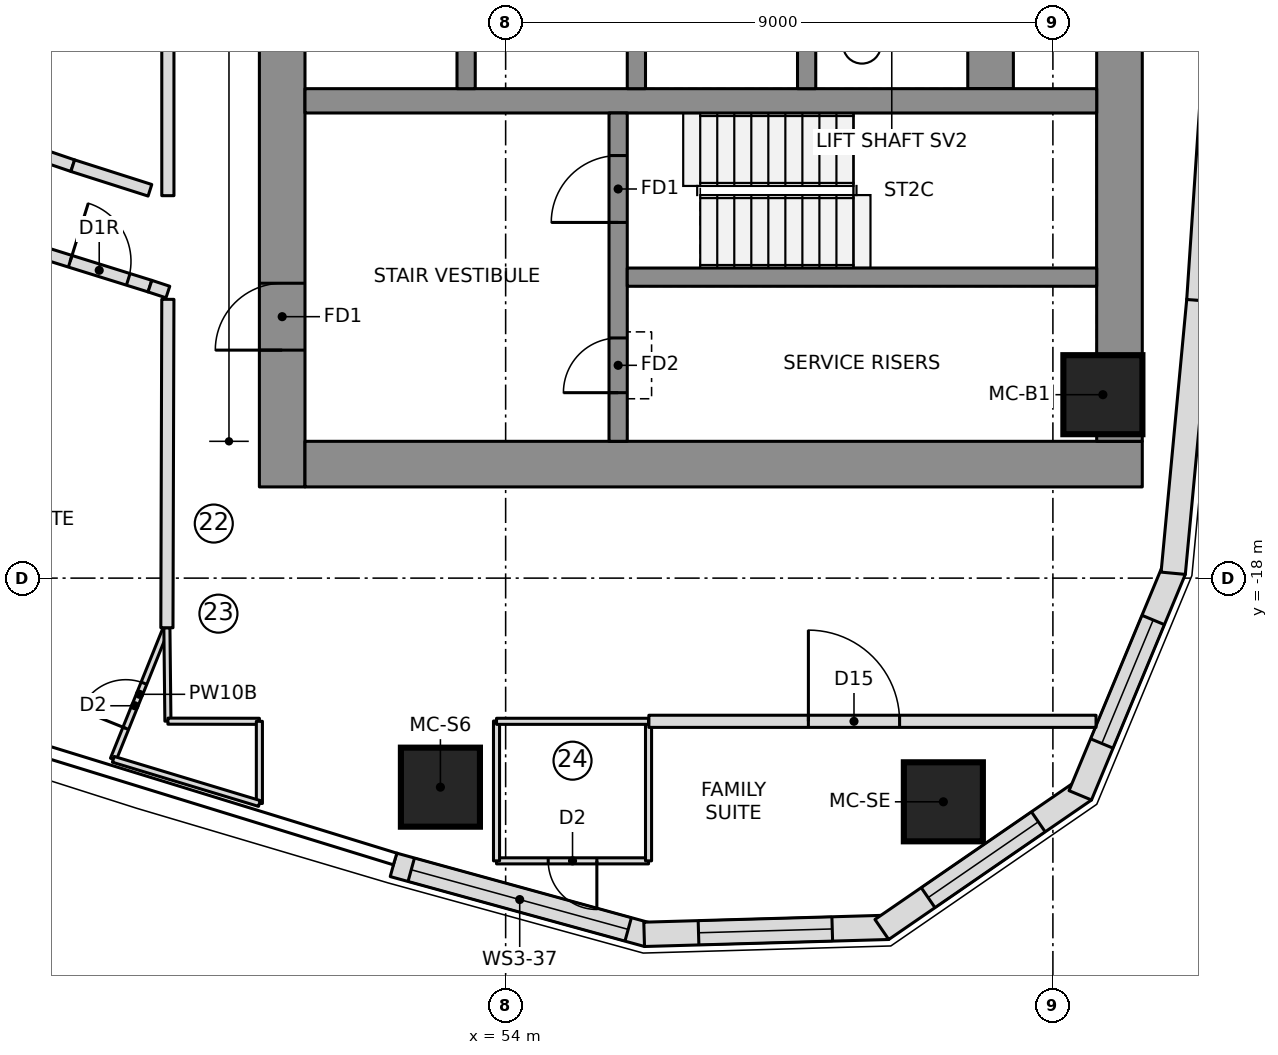
"""IFC4 building model, lengths in metres.
Left out: names, types, materials, properties, quantities, classifications, styles, units other than length and angle.
Written with IfcOpenShell. Run it as: python <this file> out.ifc"""

import sys

from ifc_helpers import new_model, si_unit, direction, frame, frame_2d, origin, origin_2d, place, context, subcontext, project, spatial, polyline, rectangle, outline, extrude, element, fill, save


model = new_model("IFC4")
c1 = context("Model", 3, precision=1e-05, world=origin(), true_north=direction((0.0, 1.0)))
c2 = subcontext(c1, "Body", "Model", "MODEL_VIEW")
j1 = project(units=[si_unit("LENGTHUNIT", "METRE"), si_unit("PLANEANGLEUNIT", "RADIAN")], contexts=[c1])
p1 = place(None, origin())
s1 = spatial("IfcSite", under=j1, at=p1, CompositionType="ELEMENT")
p2 = place(p1, origin())
s2 = spatial("IfcBuilding", under=s1, at=p2, CompositionType="ELEMENT")
p3 = place(p2, frame((0.0, 0.0, 193.25)))
s3 = spatial("IfcBuildingStorey", under=s2, at=p3, CompositionType="ELEMENT", Elevation=193.25)
p4 = place(p3, frame((50.325, -16.5, 0.0), z_axis=(0.0, 0.0, 1.0), x_axis=(0.0, 1.0, 0.0)))
e1 = element("IfcWall", 1, at=p4, inside=s3, PredefinedType="SHEAR", context=c2, shape_type="SweptSolid", body=[
    extrude(rectangle(XDim=9.85, YDim=0.75, at=frame_2d((4.925, 0.0))), origin(), (0.0, 0.0, 1.0), 3.55),
])
p5 = place(p4, frame((2.25, 0.0, 0.0)))
e2 = element("IfcOpeningElement", 2, at=p5, cuts=e1, PredefinedType="OPENING", context=c2, shape_type="SweptSolid", body=[
    extrude(rectangle(XDim=1.1, YDim=2.1, at=frame_2d((0.55, 1.05))), frame((0.0, 0.385, 0.0), z_axis=(0.0, -1.0, 0.0), x_axis=(1.0, 0.0, 0.0)), (0.0, 0.0, 1.0), 0.77),
])
p6 = place(p3, frame((50.7, -16.125, 0.0), z_axis=(0.0, 0.0, 1.0), x_axis=(1.0, 0.0, 0.0)))
e3 = element("IfcWall", 3, at=p6, inside=s3, PredefinedType="SHEAR", context=c2, shape_type="SweptSolid", body=[
    extrude(rectangle(XDim=13.77, YDim=0.75, at=frame_2d((6.885, 0.0))), origin(), (0.0, 0.0, 1.0), 3.55),
])
p7 = place(p3, frame((64.095, -15.75, 0.0), z_axis=(0.0, 0.0, 1.0), x_axis=(0.0, 1.0, 0.0)))
e4 = element("IfcWall", 4, at=p7, inside=s3, PredefinedType="SHEAR", context=c2, shape_type="SweptSolid", body=[
    extrude(rectangle(XDim=7.651, YDim=0.75, at=frame_2d((3.825, 0.0))), origin(), (0.0, 0.0, 1.0), 3.55),
])
p8 = place(p3, frame((61.975, -9.95, 0.0), z_axis=(0.0, 0.0, 1.0), x_axis=(0.0, 1.0, 0.0)))
e5 = element("IfcWall", 5, at=p8, inside=s3, PredefinedType="SHEAR", context=c2, shape_type="SweptSolid", body=[
    extrude(rectangle(XDim=19.9, YDim=0.75, at=frame_2d((9.95, 0.0))), origin(), (0.0, 0.0, 1.0), 3.55),
])
p9 = place(p3, frame((50.7, -10.15, 0.0), z_axis=(0.0, 0.0, 1.0), x_axis=(1.0, 0.0, 0.0)))
e6 = element("IfcWall", 6, at=p9, inside=s3, PredefinedType="SHEAR", context=c2, shape_type="SweptSolid", body=[
    extrude(rectangle(XDim=13.02, YDim=0.4, at=frame_2d((6.51, 0.0))), origin(), (0.0, 0.0, 1.0), 3.55),
])
for number, where, z_axis, x_axis in (
    (7, (53.35, -9.95, 0.0), (0.0, 0.0, 1.0), (0.0, 1.0, 0.0)),
    (8, (56.15, -9.95, 0.0), (0.0, 0.0, 1.0), (0.0, 1.0, 0.0)),
    (9, (58.95, -9.95, 0.0), (0.0, 0.0, 1.0), (0.0, 1.0, 0.0)),
):
    element("IfcWall", number, at=place(p3, frame(where, z_axis=z_axis, x_axis=x_axis)), inside=s3, PredefinedType="SHEAR", context=c2, shape_type="SweptSolid", body=[
        extrude(rectangle(XDim=3.0, YDim=0.3, at=frame_2d((1.5, 0.0))), origin(), (0.0, 0.0, 1.0), 3.55),
    ])
p10 = place(p3, frame((55.85, -15.75, 0.0), z_axis=(0.0, 0.0, 1.0), x_axis=(0.0, 1.0, 0.0)))
e10 = element("IfcWall", 10, at=p10, inside=s3, PredefinedType="SHEAR", context=c2, shape_type="SweptSolid", body=[
    extrude(rectangle(XDim=5.4, YDim=0.3, at=frame_2d((2.7, 0.0))), origin(), (0.0, 0.0, 1.0), 3.55),
])
p11 = place(p10, frame((3.6, 0.0, 0.0)))
e11 = element("IfcOpeningElement", 11, at=p11, cuts=e10, PredefinedType="OPENING", context=c2, shape_type="SweptSolid", body=[
    extrude(rectangle(XDim=1.1, YDim=2.1, at=frame_2d((0.55, 1.05))), frame((0.0, 0.16, 0.0), z_axis=(0.0, -1.0, 0.0), x_axis=(1.0, 0.0, 0.0)), (0.0, 0.0, 1.0), 0.32),
])
p12 = place(p10, frame((0.8, 0.0, 0.0)))
e12 = element("IfcOpeningElement", 12, at=p12, cuts=e10, PredefinedType="OPENING", context=c2, shape_type="SweptSolid", body=[
    extrude(rectangle(XDim=0.9, YDim=2.1, at=frame_2d((0.45, 1.05))), frame((0.0, 0.16, 0.0), z_axis=(0.0, -1.0, 0.0), x_axis=(1.0, 0.0, 0.0)), (0.0, 0.0, 1.0), 0.32),
])
p13 = place(p3, frame((56.0, -13.05, 0.0), z_axis=(0.0, 0.0, 1.0), x_axis=(1.0, 0.0, 0.0)))
e13 = element("IfcWall", 13, at=p13, inside=s3, PredefinedType="SHEAR", context=c2, shape_type="SweptSolid", body=[
    extrude(rectangle(XDim=7.72, YDim=0.3, at=frame_2d((3.86, 0.0))), origin(), (0.0, 0.0, 1.0), 3.55),
])
for number, where, z_axis, x_axis in (
    (14, (52.927, -21.438, 0.0), (0.0, 0.0, 1.0), (1.0, 0.0, 0.0)),
    (15, (61.198, -21.679, 0.0), (0.0, 0.0, 1.0), (1.0, 0.0, 0.0)),
    (16, (63.822, -14.983, 0.0), (0.0, 0.0, 1.0), (1.0, 0.0, 0.0)),
):
    element("IfcColumn", number, at=place(p3, frame(where, z_axis=z_axis, x_axis=x_axis)), inside=s3, PredefinedType="COLUMN", context=c2, shape_type="SweptSolid", body=[
        extrude(rectangle(XDim=1.3, YDim=1.3, at=origin_2d()), origin(), (0.0, 0.0, 1.0), 3.55),
    ])
p14 = place(p3, frame((52.155, -22.716, 0.0), z_axis=(0.0, 0.0, 1.0), x_axis=(0.964205755089, -0.265155165617, 0.0)))
e17 = element("IfcWall", 17, at=p14, inside=s3, PredefinedType="NOTDEFINED", context=c2, shape_type="SweptSolid", body=[
    extrude(outline(polyline([(0.0, -0.2), (4.337, -0.2), (4.277, 0.2), (0.0, 0.2), (0.0, -0.2)])), origin(), (0.0, 0.0, 1.0), 3.25),
])
p15 = place(p14, frame((0.303, 0.0, 0.9)))
e18 = element("IfcOpeningElement", 18, at=p15, cuts=e17, PredefinedType="OPENING", context=c2, shape_type="SweptSolid", body=[
    extrude(rectangle(XDim=3.7, YDim=1.8, at=frame_2d((1.85, 0.9))), frame((0.0, 0.21, 0.0), z_axis=(0.0, -1.0, 0.0), x_axis=(1.0, 0.0, 0.0)), (0.0, 0.0, 1.0), 0.42),
])
p16 = place(p3, frame((56.308, -23.858, 0.0), z_axis=(0.0, 0.0, 1.0), x_axis=(0.999587920197, 0.028705222472, 0.0)))
e19 = element("IfcWall", 19, at=p16, inside=s3, PredefinedType="NOTDEFINED", context=c2, shape_type="SweptSolid", body=[
    extrude(outline(polyline([(-0.03, -0.2), (3.989, -0.2), (3.87, 0.2), (0.03, 0.2), (-0.03, -0.2)])), origin(), (0.0, 0.0, 1.0), 3.25),
])
p17 = place(p16, frame((0.865, 0.0, 0.6)))
e20 = element("IfcOpeningElement", 20, at=p17, cuts=e19, PredefinedType="OPENING", context=c2, shape_type="SweptSolid", body=[
    extrude(outline(polyline([(0.0, 1.35), (0.084, 1.771), (0.322, 2.128), (0.679, 2.366), (1.1, 2.45), (1.521, 2.366), (1.878, 2.128), (2.116, 1.771), (2.2, 1.35), (2.2, 1.1), (2.116, 0.679), (1.878, 0.322), (1.521, 0.084), (1.1, 0.0), (0.679, 0.084), (0.322, 0.322), (0.084, 0.679), (0.0, 1.1), (0.0, 1.35)])), frame((0.0, 0.21, 0.0), z_axis=(0.0, -1.0, 0.0), x_axis=(1.0, 0.0, 0.0)), (0.0, 0.0, 1.0), 0.42),
])
p18 = place(p3, frame((60.236, -23.745, 0.0), z_axis=(0.0, 0.0, 1.0), x_axis=(0.823806162588, 0.566871596115, 0.0)))
e21 = element("IfcWall", 21, at=p18, inside=s3, PredefinedType="NOTDEFINED", context=c2, shape_type="SweptSolid", body=[
    extrude(outline(polyline([(-0.059, -0.2), (3.988, -0.2), (3.87, 0.2), (0.059, 0.2), (-0.059, -0.2)])), origin(), (0.0, 0.0, 1.0), 3.25),
])
p19 = place(p18, frame((0.865, 0.0, 0.6)))
e22 = element("IfcOpeningElement", 22, at=p19, cuts=e21, PredefinedType="OPENING", context=c2, shape_type="SweptSolid", body=[
    extrude(outline(polyline([(0.0, 1.35), (0.084, 1.771), (0.322, 2.128), (0.679, 2.366), (1.1, 2.45), (1.521, 2.366), (1.878, 2.128), (2.116, 1.771), (2.2, 1.35), (2.2, 1.1), (2.116, 0.679), (1.878, 0.322), (1.521, 0.084), (1.1, 0.0), (0.679, 0.084), (0.322, 0.322), (0.084, 0.679), (0.0, 1.1), (0.0, 1.35)])), frame((0.0, 0.21, 0.0), z_axis=(0.0, -1.0, 0.0), x_axis=(1.0, 0.0, 0.0)), (0.0, 0.0, 1.0), 0.42),
])
p20 = place(p3, frame((63.472, -21.518, 0.0), z_axis=(0.0, 0.0, 1.0), x_axis=(0.383997619794, 0.923334082547, 0.0)))
e23 = element("IfcWall", 23, at=p20, inside=s3, PredefinedType="NOTDEFINED", context=c2, shape_type="SweptSolid", body=[
    extrude(outline(polyline([(-0.059, -0.2), (3.959, -0.2), (3.899, 0.2), (0.059, 0.2), (-0.059, -0.2)])), origin(), (0.0, 0.0, 1.0), 3.25),
])
p21 = place(p20, frame((0.865, 0.0, 0.6)))
e24 = element("IfcOpeningElement", 24, at=p21, cuts=e23, PredefinedType="OPENING", context=c2, shape_type="SweptSolid", body=[
    extrude(outline(polyline([(0.0, 1.35), (0.084, 1.771), (0.322, 2.128), (0.679, 2.366), (1.1, 2.45), (1.521, 2.366), (1.878, 2.128), (2.116, 1.771), (2.2, 1.35), (2.2, 1.1), (2.116, 0.679), (1.878, 0.322), (1.521, 0.084), (1.1, 0.0), (0.679, 0.084), (0.322, 0.322), (0.084, 0.679), (0.0, 1.1), (0.0, 1.35)])), frame((0.0, 0.21, 0.0), z_axis=(0.0, -1.0, 0.0), x_axis=(1.0, 0.0, 0.0)), (0.0, 0.0, 1.0), 0.42),
])
p22 = place(p3, frame((64.981, -17.89, 0.0), z_axis=(0.0, 0.0, 1.0), x_axis=(0.093605694738, 0.995609348044, 0.0)))
e25 = element("IfcWall", 25, at=p22, inside=s3, PredefinedType="NOTDEFINED", context=c2, shape_type="SweptSolid", body=[
    extrude(outline(polyline([(-0.03, -0.2), (4.484, -0.2), (4.478, 0.2), (0.03, 0.2), (-0.03, -0.2)])), origin(), (0.0, 0.0, 1.0), 3.25),
])
p23 = place(p3, frame((65.401, -13.429, 0.0), z_axis=(0.0, 0.0, 1.0), x_axis=(0.066905935948, 0.997759287471, 0.0)))
e26 = element("IfcWall", 26, at=p23, inside=s3, PredefinedType="NOTDEFINED", context=c2, shape_type="SweptSolid", body=[
    extrude(outline(polyline([(-0.003, -0.2), (4.484, -0.2), (4.478, 0.2), (0.003, 0.2), (-0.003, -0.2)])), origin(), (0.0, 0.0, 1.0), 3.25),
])
p24 = place(p3, frame((56.35, -22.65, 0.0), z_axis=(0.0, 0.0, 1.0), x_axis=(-1.0, 0.0, 0.0)))
e27 = element("IfcWall", 27, at=p24, inside=s3, PredefinedType="PARTITIONING", context=c2, shape_type="SweptSolid", body=[
    extrude(rectangle(XDim=2.5, YDim=0.1, at=frame_2d((1.25, 0.0))), origin(), (0.0, 0.0, 1.0), 3.25),
])
p25 = place(p24, frame((0.85, 0.0, 0.0)))
e28 = element("IfcOpeningElement", 28, at=p25, cuts=e27, PredefinedType="OPENING", context=c2, shape_type="SweptSolid", body=[
    extrude(rectangle(XDim=0.8, YDim=2.1, at=frame_2d((0.4, 1.05))), frame((0.0, 0.06, 0.0), z_axis=(0.0, -1.0, 0.0), x_axis=(1.0, 0.0, 0.0)), (0.0, 0.0, 1.0), 0.12),
])
for number, where, z_axis, x_axis in (
    (29, (53.85, -22.65, 0.0), (0.0, 0.0, 1.0), (0.0, 1.0, 0.0)),
    (30, (56.35, -20.35, 0.0), (0.0, 0.0, 1.0), (0.0, -1.0, 0.0)),
):
    element("IfcWall", number, at=place(p3, frame(where, z_axis=z_axis, x_axis=x_axis)), inside=s3, PredefinedType="PARTITIONING", context=c2, shape_type="SweptSolid", body=[
        extrude(rectangle(XDim=2.3, YDim=0.1, at=frame_2d((1.15, 0.0))), origin(), (0.0, 0.0, 1.0), 3.25),
    ])
p26 = place(p3, frame((47.547, -20.98, 0.0), z_axis=(0.0, 0.0, 1.0), x_axis=(0.373908119057, 0.927465750582, 0.0)))
e31 = element("IfcWall", 31, at=p26, inside=s3, PredefinedType="PARTITIONING", context=c2, shape_type="SweptSolid", body=[
    extrude(rectangle(XDim=2.306, YDim=0.1, at=frame_2d((1.153, 0.0))), origin(), (0.0, 0.0, 1.0), 3.25),
])
p27 = place(p26, frame((0.55, 0.0, 0.0)))
e32 = element("IfcOpeningElement", 32, at=p27, cuts=e31, PredefinedType="OPENING", context=c2, shape_type="SweptSolid", body=[
    extrude(rectangle(XDim=0.8, YDim=2.1, at=frame_2d((0.4, 1.05))), frame((0.0, 0.06, 0.0), z_axis=(0.0, -1.0, 0.0), x_axis=(1.0, 0.0, 0.0)), (0.0, 0.0, 1.0), 0.12),
])
p28 = place(p3, frame((46.881, -11.217, 0.0), z_axis=(0.0, 0.0, 1.0), x_axis=(-0.946436071896, 0.322891253852, 0.0)))
e33 = element("IfcWall", 33, at=p28, inside=s3, PredefinedType="PARTITIONING", context=c2, shape_type="SweptSolid", body=[
    extrude(rectangle(XDim=4.117, YDim=0.2, at=frame_2d((2.059, 0.0))), origin(), (0.0, 0.0, 1.0), 3.25),
])
p29 = place(p3, frame((56.355, -20.355, 0.0), z_axis=(0.0, 0.0, 1.0), x_axis=(1.0, 0.0, 0.0)))
e34 = element("IfcWall", 34, at=p29, inside=s3, PredefinedType="PARTITIONING", context=c2, shape_type="SweptSolid", body=[
    extrude(rectangle(XDim=7.354, YDim=0.2, at=frame_2d((3.677, 0.0))), origin(), (0.0, 0.0, 1.0), 3.25),
])
p30 = place(p29, frame((2.624, 0.0, 0.0)))
e35 = element("IfcOpeningElement", 35, at=p30, cuts=e34, PredefinedType="OPENING", context=c2, shape_type="SweptSolid", body=[
    extrude(rectangle(XDim=1.5, YDim=2.1, at=frame_2d((0.75, 1.05))), frame((0.0, 0.11, 0.0), z_axis=(0.0, -1.0, 0.0), x_axis=(1.0, 0.0, 0.0)), (0.0, 0.0, 1.0), 0.22),
])
p31 = place(p3, frame((53.85, -20.355, 0.0), z_axis=(0.0, 0.0, 1.0), x_axis=(1.0, 0.0, 0.0)))
e36 = element("IfcWall", 36, at=p31, inside=s3, PredefinedType="PARTITIONING", context=c2, shape_type="SweptSolid", body=[
    extrude(rectangle(XDim=2.5, YDim=0.1, at=frame_2d((1.25, 0.0))), origin(), (0.0, 0.0, 1.0), 3.25),
])
p32 = place(p3, frame((48.429, -18.816, 0.0), z_axis=(0.0, 0.0, 1.0), x_axis=(0.010805026288, -0.999941624, 0.0)))
e37 = element("IfcWall", 37, at=p32, inside=s3, PredefinedType="PARTITIONING", context=c2, shape_type="SweptSolid", body=[
    extrude(rectangle(XDim=1.536, YDim=0.1, at=frame_2d((0.768, 0.0))), origin(), (0.0, 0.0, 1.0), 3.25),
])
p33 = place(p3, frame((48.446, -20.352, 0.0), z_axis=(0.0, 0.0, 1.0), x_axis=(0.999998406651, -0.001785131852, 0.0)))
e38 = element("IfcWall", 38, at=p33, inside=s3, PredefinedType="PARTITIONING", context=c2, shape_type="SweptSolid", body=[
    extrude(rectangle(XDim=1.504, YDim=0.1, at=frame_2d((0.752, 0.0))), origin(), (0.0, 0.0, 1.0), 3.25),
])
p34 = place(p3, frame((49.95, -20.355, 0.0), z_axis=(0.0, 0.0, 1.0), x_axis=(0.0, -1.0, 0.0)))
e39 = element("IfcWall", 39, at=p34, inside=s3, PredefinedType="PARTITIONING", context=c2, shape_type="SweptSolid", body=[
    extrude(rectangle(XDim=1.351, YDim=0.1, at=frame_2d((0.676, 0.0))), origin(), (0.0, 0.0, 1.0), 3.25),
])
p35 = place(p3, frame((49.95, -21.706, 0.0), z_axis=(0.0, 0.0, 1.0), x_axis=(-0.957251518155, 0.289256859885, 0.0)))
e40 = element("IfcWall", 40, at=p35, inside=s3, PredefinedType="PARTITIONING", context=c2, shape_type="SweptSolid", body=[
    extrude(rectangle(XDim=2.51, YDim=0.1, at=frame_2d((1.255, 0.0))), origin(), (0.0, 0.0, 1.0), 3.25),
])
p36 = place(p3, frame((46.17, -12.58, 0.0), z_axis=(0.0, 0.0, 1.0), x_axis=(0.954639063921, -0.297765440634, 0.0)))
e41 = element("IfcWall", 41, at=p36, inside=s3, PredefinedType="PARTITIONING", context=c2, shape_type="SweptSolid", body=[
    extrude(rectangle(XDim=2.073, YDim=0.2, at=frame_2d((1.037, 0.0))), origin(), (0.0, 0.0, 1.0), 3.25),
])
p37 = place(p36, frame((0.7, 0.0, 0.0)))
e42 = element("IfcOpeningElement", 42, at=p37, cuts=e41, PredefinedType="OPENING", context=c2, shape_type="SweptSolid", body=[
    extrude(rectangle(XDim=1.0, YDim=2.1, at=frame_2d((0.5, 1.05))), frame((0.0, 0.11, 0.0), z_axis=(0.0, -1.0, 0.0), x_axis=(1.0, 0.0, 0.0)), (0.0, 0.0, 1.0), 0.22),
])
p38 = place(p3, frame((48.15, -11.621, 0.0), z_axis=(0.0, 0.0, 1.0), x_axis=(-0.952761948983, 0.303718074157, 0.0)))
e43 = element("IfcWall", 43, at=p38, inside=s3, PredefinedType="PARTITIONING", context=c2, shape_type="SweptSolid", body=[
    extrude(rectangle(XDim=1.332, YDim=0.2, at=frame_2d((0.666, 0.0))), origin(), (0.0, 0.0, 1.0), 3.25),
])
p39 = place(p3, frame((48.445, 11.71, 0.0), z_axis=(0.0, 0.0, 1.0), x_axis=(0.0, -1.0, 0.0)))
e44 = element("IfcWall", 44, at=p39, inside=s3, PredefinedType="PARTITIONING", context=c2, shape_type="SweptSolid", body=[
    extrude(rectangle(XDim=23.42, YDim=0.2, at=frame_2d((11.71, 0.0))), origin(), (0.0, 0.0, 1.0), 3.25),
])
p40 = place(p3, frame((48.15, -13.198, 0.0), z_axis=(0.0, 0.0, 1.0), x_axis=(0.949621636458, -0.313398703843, 0.0)))
e45 = element("IfcWall", 45, at=p40, inside=s3, PredefinedType="PARTITIONING", context=c2, shape_type="SweptSolid", body=[
    extrude(rectangle(XDim=0.311, YDim=0.2, at=frame_2d((0.155, 0.0))), origin(), (0.0, 0.0, 1.0), 3.25),
])
p41 = place(p3, frame((48.445, -13.415, 0.0), z_axis=(0.0, 0.0, 1.0), x_axis=(-0.002938106018, -0.999995683757, 0.0)))
e46 = element("IfcWall", 46, at=p41, inside=s3, PredefinedType="PARTITIONING", context=c2, shape_type="SweptSolid", body=[
    extrude(rectangle(XDim=5.401, YDim=0.2, at=frame_2d((2.701, 0.0))), origin(), (0.0, 0.0, 1.0), 3.25),
])
p42 = place(p15, origin())
e47 = element("IfcWindow", 47, at=p42, inside=s3, PartitioningType="SINGLE_PANEL", PredefinedType="WINDOW", context=c2, shape_type="SweptSolid", body=[
    extrude(rectangle(XDim=3.7, YDim=1.8, at=frame_2d((1.85, 0.9))), frame((0.0, 0.17, 0.0), z_axis=(0.0, -1.0, 0.0), x_axis=(1.0, 0.0, 0.0)), (0.0, 0.0, 1.0), 0.06),
])
fill(e18, e47)
p43 = place(p17, origin())
e48 = element("IfcWindow", 48, at=p43, inside=s3, PartitioningType="SINGLE_PANEL", PredefinedType="WINDOW", context=c2, shape_type="SweptSolid", body=[
    extrude(outline(polyline([(0.0, 1.35), (0.084, 1.771), (0.322, 2.128), (0.679, 2.366), (1.1, 2.45), (1.521, 2.366), (1.878, 2.128), (2.116, 1.771), (2.2, 1.35), (2.2, 1.1), (2.116, 0.679), (1.878, 0.322), (1.521, 0.084), (1.1, 0.0), (0.679, 0.084), (0.322, 0.322), (0.084, 0.679), (0.0, 1.1), (0.0, 1.35)])), frame((0.0, 0.17, 0.0), z_axis=(0.0, -1.0, 0.0), x_axis=(1.0, 0.0, 0.0)), (0.0, 0.0, 1.0), 0.06),
])
fill(e20, e48)
p44 = place(p19, origin())
e49 = element("IfcWindow", 49, at=p44, inside=s3, PartitioningType="SINGLE_PANEL", PredefinedType="WINDOW", context=c2, shape_type="SweptSolid", body=[
    extrude(outline(polyline([(0.0, 1.35), (0.084, 1.771), (0.322, 2.128), (0.679, 2.366), (1.1, 2.45), (1.521, 2.366), (1.878, 2.128), (2.116, 1.771), (2.2, 1.35), (2.2, 1.1), (2.116, 0.679), (1.878, 0.322), (1.521, 0.084), (1.1, 0.0), (0.679, 0.084), (0.322, 0.322), (0.084, 0.679), (0.0, 1.1), (0.0, 1.35)])), frame((0.0, 0.17, 0.0), z_axis=(0.0, -1.0, 0.0), x_axis=(1.0, 0.0, 0.0)), (0.0, 0.0, 1.0), 0.06),
])
fill(e22, e49)
p45 = place(p21, origin())
e50 = element("IfcWindow", 50, at=p45, inside=s3, PartitioningType="SINGLE_PANEL", PredefinedType="WINDOW", context=c2, shape_type="SweptSolid", body=[
    extrude(outline(polyline([(0.0, 1.35), (0.084, 1.771), (0.322, 2.128), (0.679, 2.366), (1.1, 2.45), (1.521, 2.366), (1.878, 2.128), (2.116, 1.771), (2.2, 1.35), (2.2, 1.1), (2.116, 0.679), (1.878, 0.322), (1.521, 0.084), (1.1, 0.0), (0.679, 0.084), (0.322, 0.322), (0.084, 0.679), (0.0, 1.1), (0.0, 1.35)])), frame((0.0, 0.17, 0.0), z_axis=(0.0, -1.0, 0.0), x_axis=(1.0, 0.0, 0.0)), (0.0, 0.0, 1.0), 0.06),
])
fill(e24, e50)
p46 = place(p25, origin())
e51 = element("IfcDoor", 51, at=p46, inside=s3, OperationType="SINGLE_SWING_LEFT", PredefinedType="DOOR", context=c2, shape_type="SweptSolid", body=[
    extrude(rectangle(XDim=0.8, YDim=2.1, at=frame_2d((0.4, 1.05))), frame((0.0, 0.025, 0.0), z_axis=(0.0, -1.0, 0.0), x_axis=(1.0, 0.0, 0.0)), (0.0, 0.0, 1.0), 0.05),
])
fill(e28, e51)
p47 = place(p27, origin())
e52 = element("IfcDoor", 52, at=p47, inside=s3, OperationType="SINGLE_SWING_LEFT", PredefinedType="DOOR", context=c2, shape_type="SweptSolid", body=[
    extrude(rectangle(XDim=0.8, YDim=2.1, at=frame_2d((0.4, 1.05))), frame((0.0, 0.025, 0.0), z_axis=(0.0, -1.0, 0.0), x_axis=(1.0, 0.0, 0.0)), (0.0, 0.0, 1.0), 0.05),
])
fill(e32, e52)
p48 = place(p37, origin())
e53 = element("IfcDoor", 53, at=p48, inside=s3, OperationType="SINGLE_SWING_RIGHT", PredefinedType="DOOR", context=c2, shape_type="SweptSolid", body=[
    extrude(rectangle(XDim=1.0, YDim=2.1, at=frame_2d((0.5, 1.05))), frame((0.0, 0.025, 0.0), z_axis=(0.0, -1.0, 0.0), x_axis=(1.0, 0.0, 0.0)), (0.0, 0.0, 1.0), 0.05),
])
fill(e42, e53)
p49 = place(p30, origin())
e54 = element("IfcDoor", 54, at=p49, inside=s3, OperationType="DOUBLE_DOOR_SINGLE_SWING", PredefinedType="DOOR", context=c2, shape_type="SweptSolid", body=[
    extrude(rectangle(XDim=1.5, YDim=2.1, at=frame_2d((0.75, 1.05))), frame((0.0, 0.025, 0.0), z_axis=(0.0, -1.0, 0.0), x_axis=(1.0, 0.0, 0.0)), (0.0, 0.0, 1.0), 0.05),
])
fill(e35, e54)
p50 = place(p11, origin())
e55 = element("IfcDoor", 55, at=p50, inside=s3, OperationType="SINGLE_SWING_RIGHT", PredefinedType="DOOR", context=c2, shape_type="SweptSolid", body=[
    extrude(rectangle(XDim=1.1, YDim=2.1, at=frame_2d((0.55, 1.05))), frame((0.0, 0.025, 0.0), z_axis=(0.0, -1.0, 0.0), x_axis=(1.0, 0.0, 0.0)), (0.0, 0.0, 1.0), 0.05),
])
fill(e11, e55)
p51 = place(p5, origin())
e56 = element("IfcDoor", 56, at=p51, inside=s3, OperationType="SINGLE_SWING_RIGHT", PredefinedType="DOOR", context=c2, shape_type="SweptSolid", body=[
    extrude(rectangle(XDim=1.1, YDim=2.1, at=frame_2d((0.55, 1.05))), frame((0.0, 0.025, 0.0), z_axis=(0.0, -1.0, 0.0), x_axis=(1.0, 0.0, 0.0)), (0.0, 0.0, 1.0), 0.05),
])
fill(e2, e56)
p52 = place(p12, origin())
e57 = element("IfcDoor", 57, at=p52, inside=s3, OperationType="SINGLE_SWING_LEFT", PredefinedType="DOOR", context=c2, shape_type="SweptSolid", body=[
    extrude(rectangle(XDim=0.9, YDim=2.1, at=frame_2d((0.45, 1.05))), frame((0.0, 0.025, 0.0), z_axis=(0.0, -1.0, 0.0), x_axis=(1.0, 0.0, 0.0)), (0.0, 0.0, 1.0), 0.05),
])
fill(e12, e57)
save(model, sys.argv[1])
